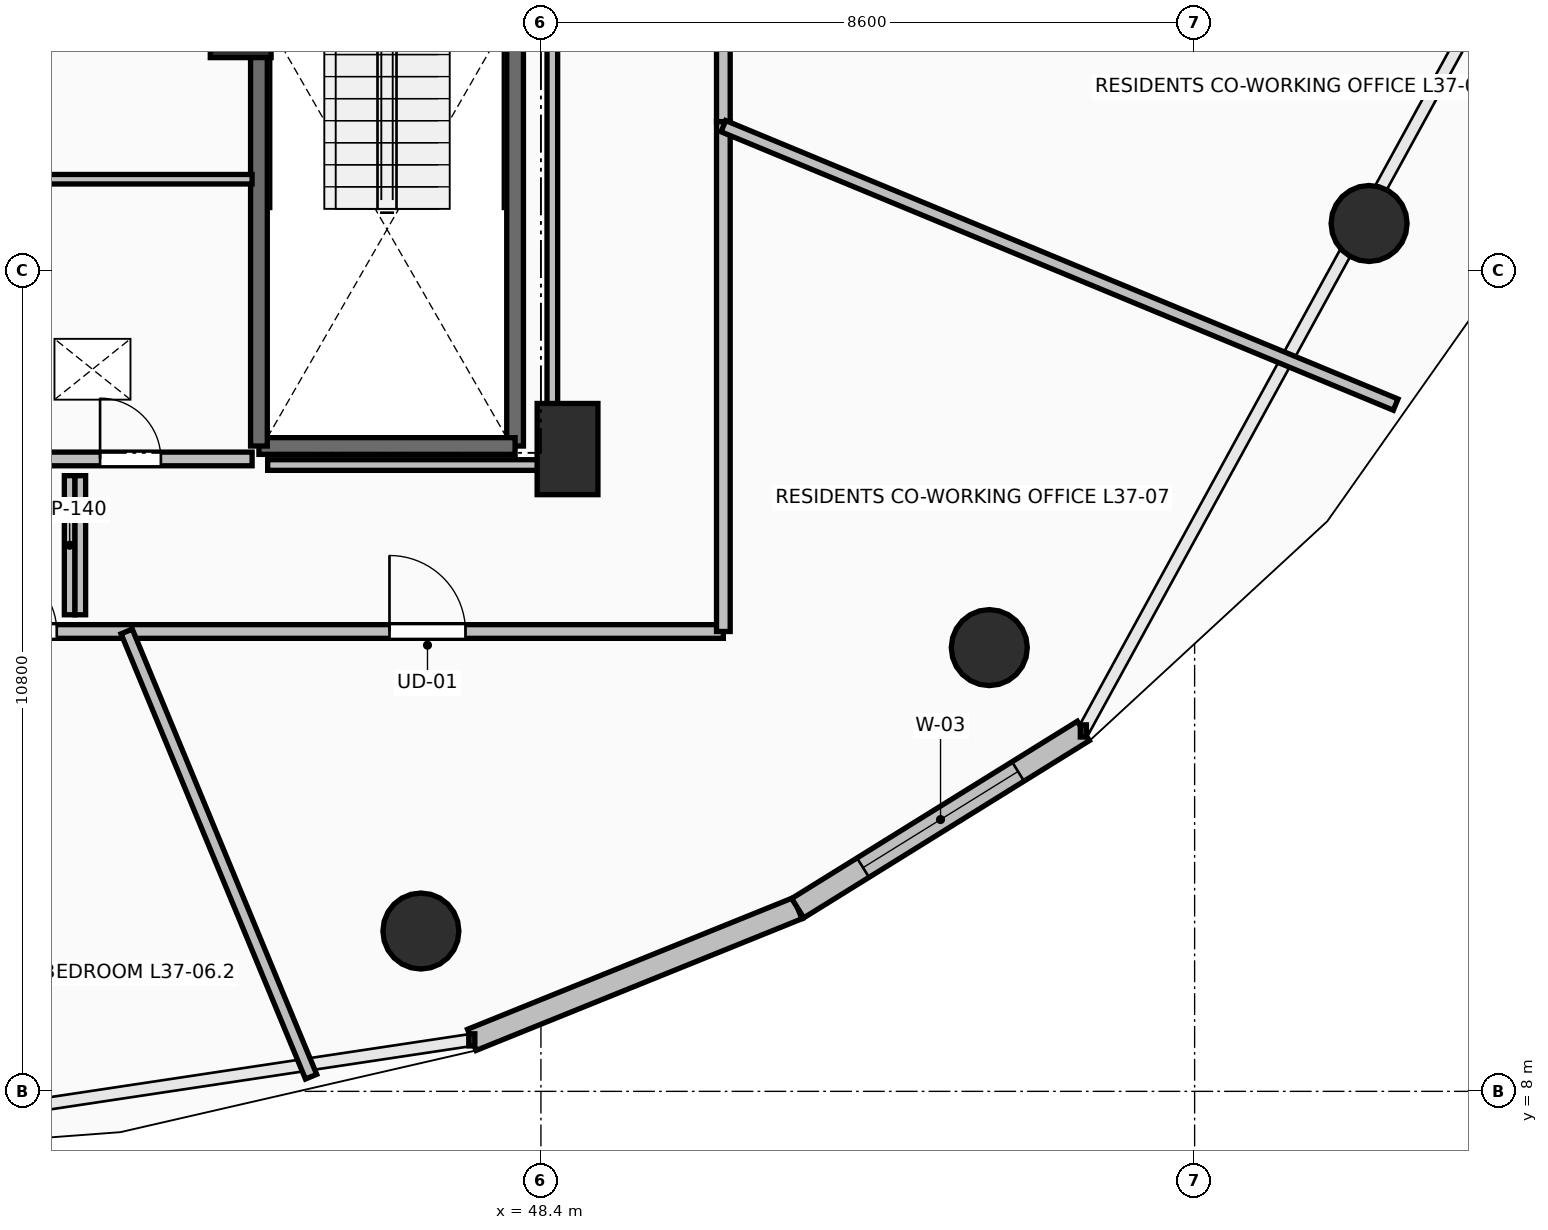
"""IFC4 building model, lengths in metres.
Left out: names, types, materials, properties, quantities, classifications, styles, units other than length and angle.
Written with IfcOpenShell. Run it as: python <this file> out.ifc"""

import sys

from ifc_helpers import new_model, si_unit, direction, frame, frame_2d, origin, origin_2d, place, context, subcontext, project, spatial, rectangle, circle, extrude, element, fill, save


model = new_model("IFC4")
c1 = context("Model", 3, precision=1e-05, world=origin(), true_north=direction((0.0, 1.0)))
c2 = subcontext(c1, "Body", "Model", "MODEL_VIEW")
j1 = project(units=[si_unit("LENGTHUNIT", "METRE"), si_unit("PLANEANGLEUNIT", "RADIAN")], contexts=[c1])
p1 = place(None, origin())
s1 = spatial("IfcSite", under=j1, at=p1, CompositionType="ELEMENT")
p2 = place(p1, origin())
s2 = spatial("IfcBuilding", under=s1, at=p2, CompositionType="ELEMENT")
p3 = place(p2, frame((0.0, 0.0, 139.6)))
s3 = spatial("IfcBuildingStorey", under=s2, at=p3, CompositionType="ELEMENT", Elevation=139.6)
for number, where, z_axis, x_axis in (
    (1, (46.821, 10.109, 0.0), (0.0, 0.0, 1.0), (0.383, -0.924, 0.0)),
    (2, (54.299, 13.838, 0.0), (0.0, 0.0, 1.0), (0.707, -0.707, 0.0)),
    (3, (59.295, 19.418, 0.0), (0.0, 0.0, 1.0), (0.924, -0.383, 0.0)),
):
    element("IfcColumn", number, at=place(p3, frame(where, z_axis=z_axis, x_axis=x_axis)), inside=s3, PredefinedType="COLUMN", context=c2, shape_type="SweptSolid", body=[
        extrude(circle(Radius=0.5, at=origin_2d()), origin(), (0.0, 0.0, 1.0), 3.5),
    ])
for number, where, z_axis, x_axis in (
    (4, (48.75, 16.45, 0.0), (0.0, 0.0, 1.0), (1.0, 0.0, 0.0)),
    (5, (44.45, 22.2, 0.0), (0.0, 0.0, 1.0), (1.0, 0.0, 0.0)),
):
    element("IfcColumn", number, at=place(p3, frame(where, z_axis=z_axis, x_axis=x_axis)), inside=s3, PredefinedType="PILASTER", context=c2, shape_type="SweptSolid", body=[
        extrude(rectangle(XDim=0.8, YDim=1.2, at=origin_2d()), origin(), (0.0, 0.0, 1.0), 3.5),
    ])
p4 = place(p3, frame((47.49, 8.677, 0.0), z_axis=(0.0, 0.0, 1.0), x_axis=(0.927156504392, 0.374674280359, 0.0)))
e6 = element("IfcWall", 6, at=p4, inside=s3, PredefinedType="STANDARD", context=c2, shape_type="SweptSolid", body=[
    extrude(rectangle(XDim=4.625, YDim=0.3, at=frame_2d((2.312, 0.0))), origin(), (0.0, 0.0, 1.0), 3.24),
])
p5 = place(p3, frame((51.778, 10.41, 0.0), z_axis=(0.0, 0.0, 1.0), x_axis=(0.849721181976, 0.527232313977, 0.0)))
e7 = element("IfcWall", 7, at=p5, inside=s3, PredefinedType="STANDARD", context=c2, shape_type="SweptSolid", body=[
    extrude(rectangle(XDim=4.423, YDim=0.3, at=frame_2d((2.211, 0.0))), origin(), (0.0, 0.0, 1.0), 3.24),
])
p6 = place(p5, frame((1.011, 0.0, 0.85)))
e8 = element("IfcOpeningElement", 8, at=p6, cuts=e7, PredefinedType="OPENING", context=c2, shape_type="SweptSolid", body=[
    extrude(rectangle(XDim=2.4, YDim=2.19, at=frame_2d((1.2, 1.095))), frame((0.0, 0.165, 0.0), z_axis=(0.0, -1.0, 0.0), x_axis=(1.0, 0.0, 0.0)), (0.0, 0.0, 1.0), 0.33),
])
p7 = place(p3, frame((48.06, 23.91, 0.0), z_axis=(0.0, 0.0, 1.0), x_axis=(0.0, -1.0, 0.0)))
e9 = element("IfcWall", 9, at=p7, inside=s3, PredefinedType="SOLIDWALL", context=c2, shape_type="SweptSolid", body=[
    extrude(rectangle(XDim=7.42, YDim=0.22, at=frame_2d((3.71, 0.0))), origin(), (0.0, 0.0, 1.0), 3.24),
])
p8 = place(p3, frame((48.06, 16.49, 0.0), z_axis=(0.0, 0.0, 1.0), x_axis=(-1.0, 0.0, 0.0)))
e10 = element("IfcWall", 10, at=p8, inside=s3, PredefinedType="SOLIDWALL", context=c2, shape_type="SweptSolid", body=[
    extrude(rectangle(XDim=3.37, YDim=0.22, at=frame_2d((1.685, 0.0))), origin(), (0.0, 0.0, 1.0), 3.24),
])
p9 = place(p3, frame((44.69, 16.49, 0.0), z_axis=(0.0, 0.0, 1.0), x_axis=(0.0, 1.0, 0.0)))
e11 = element("IfcWall", 11, at=p9, inside=s3, PredefinedType="SOLIDWALL", context=c2, shape_type="SweptSolid", body=[
    extrude(rectangle(XDim=7.42, YDim=0.22, at=frame_2d((3.71, 0.0))), origin(), (0.0, 0.0, 1.0), 3.24),
])
p10 = place(p3, frame((44.6, 20.0, 0.0), z_axis=(0.0, 0.0, 1.0), x_axis=(-1.0, 0.0, 0.0)))
e12 = element("IfcWall", 12, at=p10, inside=s3, PredefinedType="PARTITIONING", context=c2, shape_type="SweptSolid", body=[
    extrude(rectangle(XDim=3.2, YDim=0.125, at=frame_2d((1.6, 0.0))), origin(), (0.0, 0.0, 1.0), 3.24),
])
p11 = place(p3, frame((41.4, 16.32, 0.0), z_axis=(0.0, 0.0, 1.0), x_axis=(1.0, 0.0, 0.0)))
e13 = element("IfcWall", 13, at=p11, inside=s3, PredefinedType="PARTITIONING", context=c2, shape_type="SweptSolid", body=[
    extrude(rectangle(XDim=3.2, YDim=0.18, at=frame_2d((1.6, 0.0))), origin(), (0.0, 0.0, 1.0), 3.24),
])
p12 = place(p11, frame((1.2, 0.0, 0.0)))
e14 = element("IfcOpeningElement", 14, at=p12, cuts=e13, PredefinedType="OPENING", context=c2, shape_type="SweptSolid", body=[
    extrude(rectangle(XDim=0.8, YDim=2.05, at=frame_2d((0.4, 1.025))), frame((0.0, 0.105, 0.0), z_axis=(0.0, -1.0, 0.0), x_axis=(1.0, 0.0, 0.0)), (0.0, 0.0, 1.0), 0.21),
])
p13 = place(p3, frame((40.195, 14.05, 0.0), z_axis=(0.0, 0.0, 1.0), x_axis=(1.0, 0.0, 0.0)))
e15 = element("IfcWall", 15, at=p13, inside=s3, PredefinedType="PARTITIONING", context=c2, shape_type="SweptSolid", body=[
    extrude(rectangle(XDim=2.82, YDim=0.18, at=frame_2d((1.41, 0.0))), origin(), (0.0, 0.0, 1.0), 2.972),
])
p14 = place(p13, frame((0.985, 0.0, 0.0)))
e16 = element("IfcOpeningElement", 16, at=p14, cuts=e15, PredefinedType="OPENING", context=c2, shape_type="SweptSolid", body=[
    extrude(rectangle(XDim=0.85, YDim=2.1, at=frame_2d((0.425, 1.05))), frame((0.0, 0.105, 0.0), z_axis=(0.0, -1.0, 0.0), x_axis=(1.0, 0.0, 0.0)), (0.0, 0.0, 1.0), 0.21),
])
p15 = place(p3, frame((43.015, 14.05, 0.0), z_axis=(0.0, 0.0, 1.0), x_axis=(1.0, 0.0, 0.0)))
e17 = element("IfcWall", 17, at=p15, inside=s3, PredefinedType="PARTITIONING", context=c2, shape_type="SweptSolid", body=[
    extrude(rectangle(XDim=7.785, YDim=0.18, at=frame_2d((3.893, 0.0))), origin(), (0.0, 0.0, 1.0), 2.432),
])
p16 = place(p15, frame((3.393, 0.0, 0.0)))
e18 = element("IfcOpeningElement", 18, at=p16, cuts=e17, PredefinedType="OPENING", context=c2, shape_type="SweptSolid", body=[
    extrude(rectangle(XDim=1.0, YDim=2.15, at=frame_2d((0.5, 1.075))), frame((0.0, 0.105, 0.0), z_axis=(0.0, -1.0, 0.0), x_axis=(1.0, 0.0, 0.0)), (0.0, 0.0, 1.0), 0.21),
])
p17 = place(p3, frame((50.8, 14.05, 0.0), z_axis=(0.0, 0.0, 1.0), x_axis=(0.0, 1.0, 0.0)))
e19 = element("IfcWall", 19, at=p17, inside=s3, PredefinedType="PARTITIONING", context=c2, shape_type="SweptSolid", body=[
    extrude(rectangle(XDim=6.708, YDim=0.18, at=frame_2d((3.354, 0.0))), origin(), (0.0, 0.0, 1.0), 2.432),
])
p18 = place(p3, frame((50.8, 20.758, 0.0), z_axis=(0.0, 0.0, 1.0), x_axis=(0.0, 1.0, 0.0)))
e20 = element("IfcWall", 20, at=p18, inside=s3, PredefinedType="PARTITIONING", context=c2, shape_type="SweptSolid", body=[
    extrude(rectangle(XDim=3.792, YDim=0.18, at=frame_2d((1.896, 0.0))), origin(), (0.0, 0.0, 1.0), 3.24),
])
p19 = place(p3, frame((45.376, 8.193, 0.0), z_axis=(0.0, 0.0, 1.0), x_axis=(-0.382683979298, 0.923879305964, 0.0)))
e21 = element("IfcWall", 21, at=p19, inside=s3, PredefinedType="PARTITIONING", context=c2, shape_type="SweptSolid", body=[
    extrude(rectangle(XDim=6.34, YDim=0.16, at=frame_2d((3.17, 0.0))), origin(), (0.0, 0.0, 1.0), 2.432),
])
p20 = place(p3, frame((59.645, 17.035, 0.0), z_axis=(0.0, 0.0, 1.0), x_axis=(-0.923902460479, 0.382628074665, 0.0)))
e22 = element("IfcWall", 22, at=p20, inside=s3, PredefinedType="PARTITIONING", context=c2, shape_type="SweptSolid", body=[
    extrude(rectangle(XDim=9.573, YDim=0.16, at=frame_2d((4.787, 0.0))), origin(), (0.0, 0.0, 1.0), 2.728),
])
p21 = place(p3, frame((48.55, 16.24, 0.0), z_axis=(0.0, 0.0, 1.0), x_axis=(0.0, 1.0, 0.0)))
e23 = element("IfcWall", 23, at=p21, inside=s3, PredefinedType="PARTITIONING", context=c2, shape_type="SweptSolid", body=[
    extrude(rectangle(XDim=7.514, YDim=0.14, at=frame_2d((3.757, 0.0))), origin(), (0.0, 0.0, 1.0), 2.432),
])
for number, where, z_axis, x_axis in (
    (24, (42.2, 16.1, 0.0), (0.0, 0.0, 1.0), (0.0, -1.0, 0.0)),
    (25, (42.34, 14.27, 0.0), (0.0, 0.0, 1.0), (0.0, 1.0, 0.0)),
):
    element("IfcWall", number, at=place(p3, frame(where, z_axis=z_axis, x_axis=x_axis)), inside=s3, PredefinedType="PARTITIONING", context=c2, shape_type="SweptSolid", body=[
        extrude(rectangle(XDim=1.83, YDim=0.14, at=frame_2d((0.915, 0.0))), origin(), (0.0, 0.0, 1.0), 3.24),
    ])
p22 = place(p3, frame((44.805, 16.24, 0.0), z_axis=(0.0, 0.0, 1.0), x_axis=(1.0, 0.0, 0.0)))
e26 = element("IfcWall", 26, at=p22, inside=s3, PredefinedType="PARTITIONING", context=c2, shape_type="SweptSolid", body=[
    extrude(rectangle(XDim=3.745, YDim=0.14, at=frame_2d((1.873, 0.0))), origin(), (0.0, 0.0, 1.0), 2.432),
])
p23 = place(p6, origin())
e27 = element("IfcWindow", 27, at=p23, inside=s3, PartitioningType="SINGLE_PANEL", PredefinedType="WINDOW", context=c2, shape_type="SweptSolid", body=[
    extrude(rectangle(XDim=2.4, YDim=2.19, at=frame_2d((1.2, 1.095))), frame((0.0, 0.03, 0.0), z_axis=(0.0, -1.0, 0.0), x_axis=(1.0, 0.0, 0.0)), (0.0, 0.0, 1.0), 0.06),
])
fill(e8, e27)
p24 = place(p12, origin())
e28 = element("IfcDoor", 28, at=p24, inside=s3, OperationType="SINGLE_SWING_LEFT", PredefinedType="DOOR", context=c2, shape_type="SweptSolid", body=[
    extrude(rectangle(XDim=0.8, YDim=2.05, at=frame_2d((0.4, 1.025))), frame((0.0, 0.025, 0.0), z_axis=(0.0, -1.0, 0.0), x_axis=(1.0, 0.0, 0.0)), (0.0, 0.0, 1.0), 0.05),
])
fill(e14, e28)
p25 = place(p16, origin())
e29 = element("IfcDoor", 29, at=p25, inside=s3, OperationType="SINGLE_SWING_LEFT", PredefinedType="DOOR", context=c2, shape_type="SweptSolid", body=[
    extrude(rectangle(XDim=1.0, YDim=2.15, at=frame_2d((0.5, 1.075))), frame((0.0, 0.025, 0.0), z_axis=(0.0, -1.0, 0.0), x_axis=(1.0, 0.0, 0.0)), (0.0, 0.0, 1.0), 0.05),
])
fill(e18, e29)
p26 = place(p14, origin())
e30 = element("IfcDoor", 30, at=p26, inside=s3, OperationType="SINGLE_SWING_LEFT", PredefinedType="DOOR", context=c2, shape_type="SweptSolid", body=[
    extrude(rectangle(XDim=0.85, YDim=2.1, at=frame_2d((0.425, 1.05))), frame((0.0, 0.025, 0.0), z_axis=(0.0, -1.0, 0.0), x_axis=(1.0, 0.0, 0.0)), (0.0, 0.0, 1.0), 0.05),
])
fill(e16, e30)
save(model, sys.argv[1])
